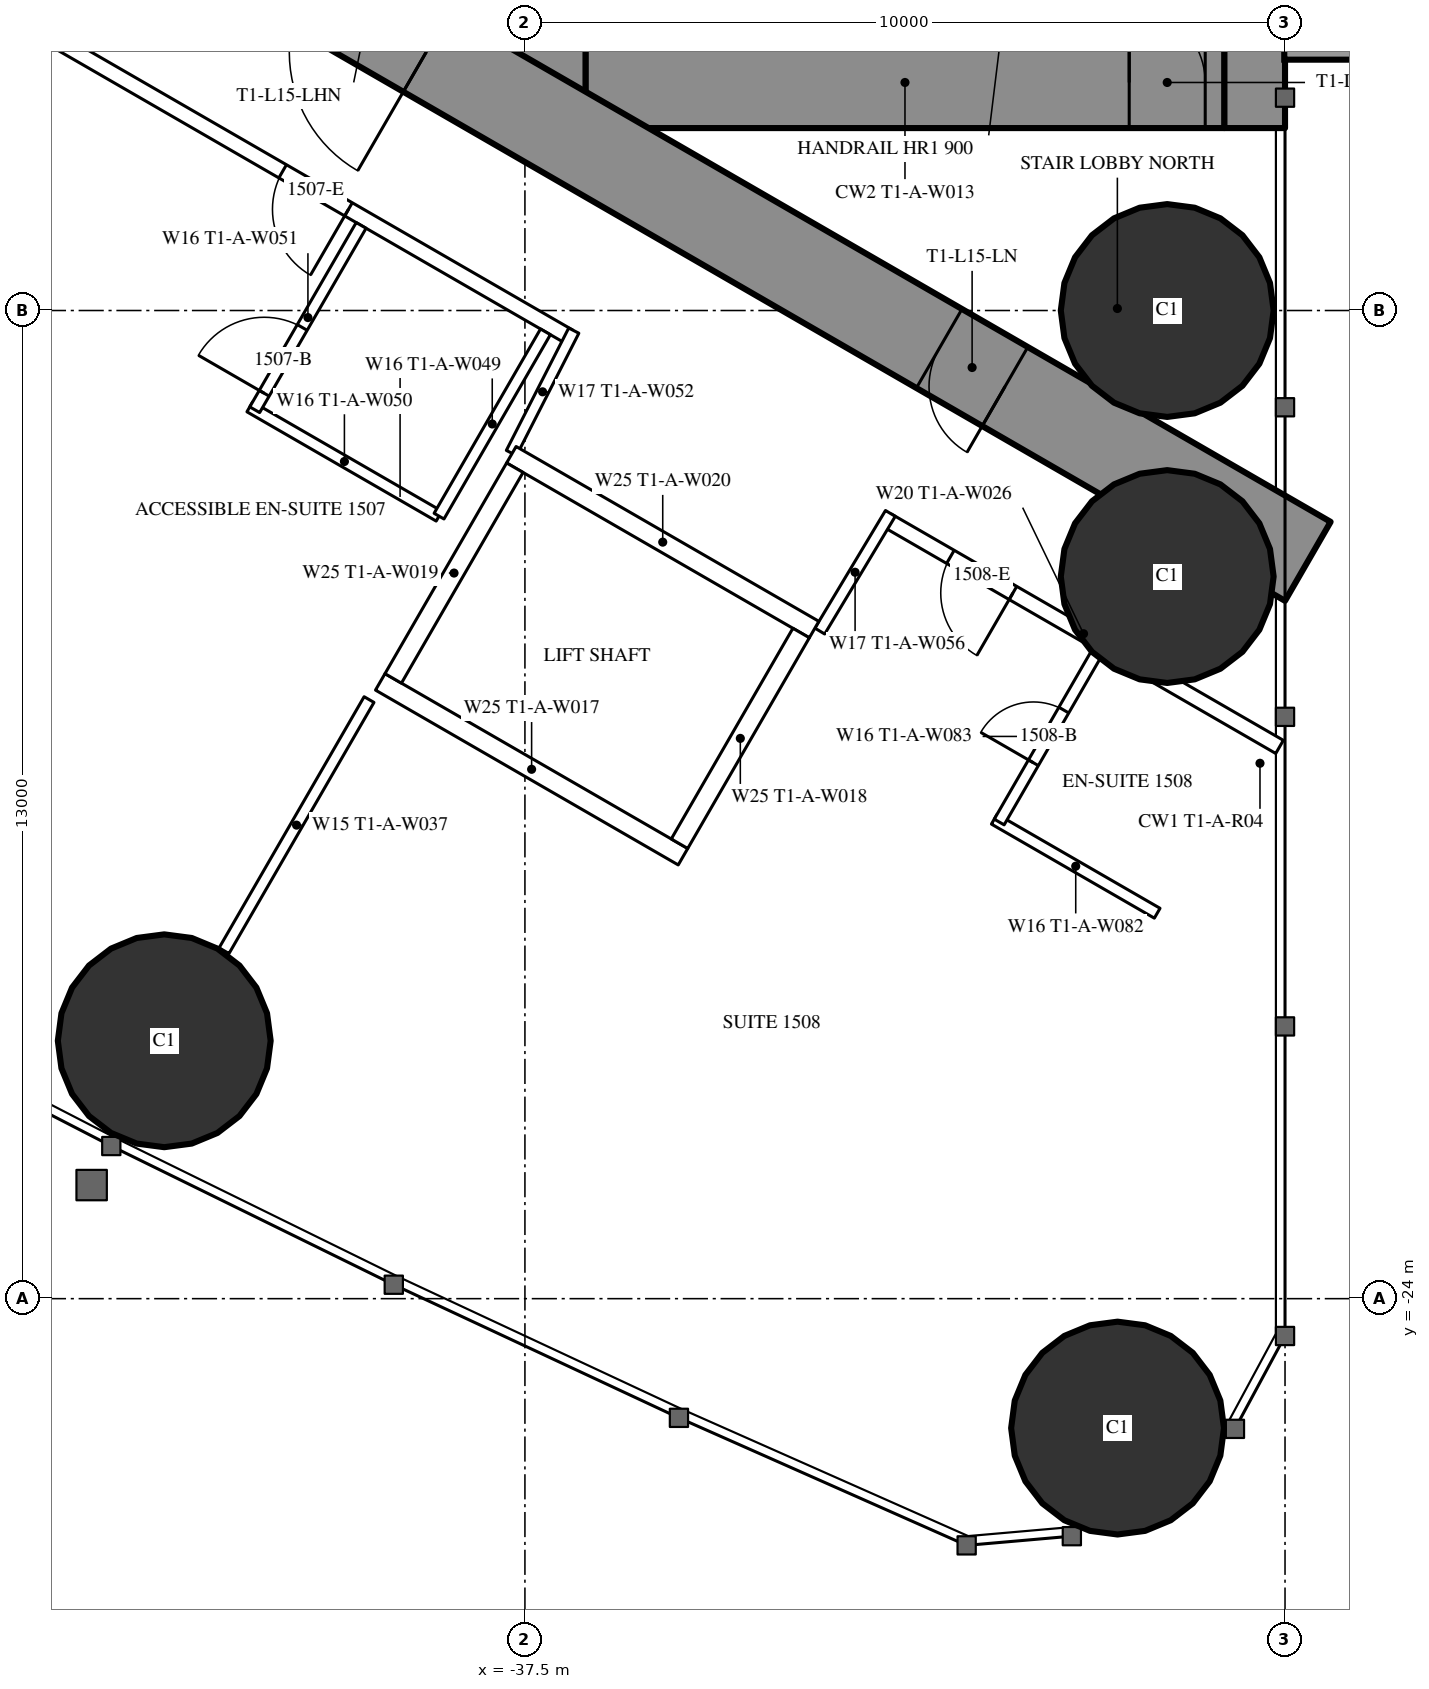
"""IFC4 building model, lengths in metres.
Left out: names, types, materials, properties, quantities, classifications, styles, units other than length and angle.
Written with IfcOpenShell. Run it as: python <this file> out.ifc"""

import sys

from ifc_helpers import new_model, si_unit, direction, frame, frame_2d, origin, origin_2d, place, context, subcontext, project, spatial, rectangle, hollow_circle, extrude, element, fill, save


model = new_model("IFC4")
c1 = context("Model", 3, precision=1e-05, world=origin(), true_north=direction((0.0, 1.0)))
c2 = subcontext(c1, "Body", "Model", "MODEL_VIEW")
j1 = project(units=[si_unit("LENGTHUNIT", "METRE"), si_unit("PLANEANGLEUNIT", "RADIAN")], contexts=[c1])
p1 = place(None, origin())
s1 = spatial("IfcSite", under=j1, at=p1, CompositionType="ELEMENT")
p2 = place(p1, origin())
s2 = spatial("IfcBuilding", under=s1, at=p2, CompositionType="ELEMENT")
p3 = place(p2, frame((0.0, 0.0, 60.0)))
s3 = spatial("IfcBuildingStorey", under=s2, at=p3, CompositionType="ELEMENT", Elevation=60.0)
for number, where, z_axis, x_axis in (
    (1, (-29.703, -25.703, 0.0), (0.0, 0.0, 1.0), (1.0, 0.0, 0.0)),
    (2, (-29.05, -11.0, 0.0), (0.0, 0.0, 1.0), (1.0, 0.0, 0.0)),
    (3, (-29.05, -14.5, 0.0), (0.0, 0.0, 1.0), (1.0, 0.0, 0.0)),
    (4, (-42.245, -20.607, 0.0), (0.0, 0.0, 1.0), (1.0, 0.0, 0.0)),
):
    element("IfcColumn", number, at=place(p3, frame(where, z_axis=z_axis, x_axis=x_axis)), inside=s3, PredefinedType="COLUMN", context=c2, shape_type="SweptSolid", body=[
        extrude(hollow_circle(Radius=1.4, WallThickness=0.12, at=origin_2d()), origin(), (0.0, 0.0, 1.0), 3.5),
    ])
p4 = place(p3, frame((-27.9, 8.6, 0.0), z_axis=(0.0, 0.0, 1.0), x_axis=(0.0, -1.0, 0.0)))
e5 = element("IfcWall", 5, at=p4, inside=s3, PredefinedType="SHEAR", context=c2, shape_type="SweptSolid", body=[
    extrude(rectangle(XDim=17.2, YDim=0.8, at=frame_2d((8.6, 0.0))), origin(), (0.0, 0.0, 1.0), 3.5),
])
p5 = place(p4, frame((2.45, 0.0, 0.6)))
e6 = element("IfcOpeningElement", 6, at=p5, cuts=e5, PredefinedType="OPENING", context=c2, shape_type="SweptSolid", body=[
    extrude(rectangle(XDim=0.6, YDim=2.1, at=frame_2d((0.3, 1.05))), frame((0.0, 0.41, 0.0), z_axis=(0.0, -1.0, 0.0), x_axis=(1.0, 0.0, 0.0)), (0.0, 0.0, 1.0), 0.82),
])
p6 = place(p4, frame((14.15, 0.0, 0.6)))
e7 = element("IfcOpeningElement", 7, at=p6, cuts=e5, PredefinedType="OPENING", context=c2, shape_type="SweptSolid", body=[
    extrude(rectangle(XDim=0.6, YDim=2.1, at=frame_2d((0.3, 1.05))), frame((0.0, 0.41, 0.0), z_axis=(0.0, -1.0, 0.0), x_axis=(1.0, 0.0, 0.0)), (0.0, 0.0, 1.0), 0.82),
])
p7 = place(p3, frame((-37.3, 8.6, 0.0), z_axis=(0.0, 0.0, 1.0), x_axis=(0.0, -1.0, 0.0)))
e8 = element("IfcWall", 8, at=p7, inside=s3, PredefinedType="SHEAR", context=c2, shape_type="SweptSolid", body=[
    extrude(rectangle(XDim=17.2, YDim=1.2, at=frame_2d((8.6, 0.0))), origin(), (0.0, 0.0, 1.0), 3.5),
])
p8 = place(p7, frame((7.7, 0.0, 0.0)))
e9 = element("IfcOpeningElement", 9, at=p8, cuts=e8, PredefinedType="OPENING", context=c2, shape_type="SweptSolid", body=[
    extrude(rectangle(XDim=1.8, YDim=2.2, at=frame_2d((0.9, 1.1))), frame((0.0, 0.61, 0.0), z_axis=(0.0, -1.0, 0.0), x_axis=(1.0, 0.0, 0.0)), (0.0, 0.0, 1.0), 1.22),
])
p9 = place(p3, frame((-28.3, -8.0, 0.0), z_axis=(0.0, 0.0, 1.0), x_axis=(-1.0, 0.0, 0.0)))
e10 = element("IfcWall", 10, at=p9, inside=s3, PredefinedType="SHEAR", context=c2, shape_type="SweptSolid", body=[
    extrude(rectangle(XDim=8.4, YDim=1.2, at=frame_2d((4.2, 0.0))), origin(), (0.0, 0.0, 1.0), 3.5),
])
p10 = place(p9, frame((0.25, 0.0, 0.0)))
e11 = element("IfcOpeningElement", 11, at=p10, cuts=e10, PredefinedType="OPENING", context=c2, shape_type="SweptSolid", body=[
    extrude(rectangle(XDim=1.0, YDim=2.2, at=frame_2d((0.5, 1.1))), frame((0.0, 0.61, 0.0), z_axis=(0.0, -1.0, 0.0), x_axis=(1.0, 0.0, 0.0)), (0.0, 0.0, 1.0), 1.22),
])
p11 = place(p3, frame((-27.2, -14.3, 0.0), z_axis=(0.0, 0.0, 1.0), x_axis=(-0.866024021859, 0.500002393557, 0.0)))
e12 = element("IfcWall", 12, at=p11, inside=s3, PredefinedType="SHEAR", context=c2, shape_type="SweptSolid", body=[
    extrude(rectangle(XDim=27.907, YDim=1.2, at=frame_2d((13.954, 0.0))), origin(), (0.0, 0.0, 1.0), 3.5),
])
p12 = place(p11, frame((4.6, 0.0, 0.0)))
e13 = element("IfcOpeningElement", 13, at=p12, cuts=e12, PredefinedType="OPENING", context=c2, shape_type="SweptSolid", body=[
    extrude(rectangle(XDim=1.0, YDim=2.2, at=frame_2d((0.5, 1.1))), frame((0.0, 0.61, 0.0), z_axis=(0.0, -1.0, 0.0), x_axis=(1.0, 0.0, 0.0)), (0.0, 0.0, 1.0), 1.22),
])
p13 = place(p11, frame((13.395, 0.0, 0.0)))
e14 = element("IfcOpeningElement", 14, at=p13, cuts=e12, PredefinedType="OPENING", context=c2, shape_type="SweptSolid", body=[
    extrude(rectangle(XDim=1.8, YDim=2.2, at=frame_2d((0.9, 1.1))), frame((0.0, 0.61, 0.0), z_axis=(0.0, -1.0, 0.0), x_axis=(1.0, 0.0, 0.0)), (0.0, 0.0, 1.0), 1.22),
])
p14 = place(p3, frame((-39.551, -16.118, 0.0), z_axis=(0.0, 0.0, 1.0), x_axis=(-0.499986503906, -0.866033195618, 0.0)))
e15 = element("IfcWall", 15, at=p14, inside=s3, PredefinedType="PARTITIONING", context=c2, shape_type="SweptSolid", body=[
    extrude(rectangle(XDim=3.815, YDim=0.15, at=frame_2d((1.907, 0.0))), origin(), (0.0, 0.0, 1.0), 3.25),
])
p15 = place(p3, frame((-27.572, -16.741, 0.0), z_axis=(0.0, 0.0, 1.0), x_axis=(-0.866024464444, 0.500001626982, 0.0)))
e16 = element("IfcWall", 16, at=p15, inside=s3, PredefinedType="PARTITIONING", context=c2, shape_type="SweptSolid", body=[
    extrude(rectangle(XDim=5.955, YDim=0.2, at=frame_2d((2.978, 0.0))), origin(), (0.0, 0.0, 1.0), 3.25),
])
p16 = place(p15, frame((4.05, 0.0, 0.0)))
e17 = element("IfcOpeningElement", 17, at=p16, cuts=e16, PredefinedType="OPENING", context=c2, shape_type="SweptSolid", body=[
    extrude(rectangle(XDim=0.95, YDim=2.2, at=frame_2d((0.475, 1.1))), frame((0.0, 0.11, 0.0), z_axis=(0.0, -1.0, 0.0), x_axis=(1.0, 0.0, 0.0)), (0.0, 0.0, 1.0), 0.22),
])
p17 = place(p3, frame((-36.92, -11.344, 0.0), z_axis=(0.0, 0.0, 1.0), x_axis=(-0.866028313256, 0.499994960614, 0.0)))
e18 = element("IfcWall", 18, at=p17, inside=s3, PredefinedType="PARTITIONING", context=c2, shape_type="SweptSolid", body=[
    extrude(rectangle(XDim=22.568, YDim=0.2, at=frame_2d((11.284, 0.0))), origin(), (0.0, 0.0, 1.0), 3.25),
])
p18 = place(p17, frame((12.68, 0.0, 0.0)))
e19 = element("IfcOpeningElement", 19, at=p18, cuts=e18, PredefinedType="OPENING", context=c2, shape_type="SweptSolid", body=[
    extrude(rectangle(XDim=0.95, YDim=2.2, at=frame_2d((0.475, 1.1))), frame((0.0, 0.11, 0.0), z_axis=(0.0, -1.0, 0.0), x_axis=(1.0, 0.0, 0.0)), (0.0, 0.0, 1.0), 0.22),
])
p19 = place(p17, frame((3.35, 0.0, 0.0)))
e20 = element("IfcOpeningElement", 20, at=p19, cuts=e18, PredefinedType="OPENING", context=c2, shape_type="SweptSolid", body=[
    extrude(rectangle(XDim=1.0, YDim=2.2, at=frame_2d((0.5, 1.1))), frame((0.0, 0.11, 0.0), z_axis=(0.0, -1.0, 0.0), x_axis=(1.0, 0.0, 0.0)), (0.0, 0.0, 1.0), 0.22),
])
p20 = place(p3, frame((-36.857, -11.265, 0.0), z_axis=(0.0, 0.0, 1.0), x_axis=(-0.454225294761, -0.890886851176, 0.0)))
e21 = element("IfcWall", 21, at=p20, inside=s3, PredefinedType="PARTITIONING", context=c2, shape_type="SweptSolid", body=[
    extrude(rectangle(XDim=1.807, YDim=0.15, at=frame_2d((0.904, 0.0))), origin(), (0.0, 0.0, 1.0), 3.25),
])
p21 = place(p3, frame((-33.621, -15.218, 0.0), z_axis=(0.0, 0.0, 1.0), x_axis=(0.514336634837, 0.857588377991, 0.0)))
e22 = element("IfcWall", 22, at=p21, inside=s3, PredefinedType="PARTITIONING", context=c2, shape_type="SweptSolid", body=[
    extrude(rectangle(XDim=1.805, YDim=0.15, at=frame_2d((0.903, 0.0))), origin(), (0.0, 0.0, 1.0), 3.25),
])
p22 = place(p3, frame((-38.63, -13.705, 0.0), z_axis=(0.0, 0.0, 1.0), x_axis=(-0.866018712932, 0.500011588718, 0.0)))
e23 = element("IfcWall", 23, at=p22, inside=s3, PredefinedType="PARTITIONING", context=c2, shape_type="SweptSolid", body=[
    extrude(rectangle(XDim=2.875, YDim=0.15, at=frame_2d((1.438, 0.0))), origin(), (0.0, 0.0, 1.0), 3.25),
])
p23 = place(p3, frame((-39.655, -9.88, 0.0), z_axis=(0.0, 0.0, 1.0), x_axis=(-0.500049511043, -0.865996816683, 0.0)))
e24 = element("IfcWall", 24, at=p23, inside=s3, PredefinedType="PARTITIONING", context=c2, shape_type="SweptSolid", body=[
    extrude(rectangle(XDim=2.8, YDim=0.15, at=frame_2d((1.4, 0.0))), origin(), (0.0, 0.0, 1.0), 3.25),
])
p24 = place(p23, frame((1.55, 0.0, 0.0)))
e25 = element("IfcOpeningElement", 25, at=p24, cuts=e24, PredefinedType="OPENING", context=c2, shape_type="SweptSolid", body=[
    extrude(rectangle(XDim=1.0, YDim=2.2, at=frame_2d((0.5, 1.1))), frame((0.0, 0.085, 0.0), z_axis=(0.0, -1.0, 0.0), x_axis=(1.0, 0.0, 0.0)), (0.0, 0.0, 1.0), 0.17),
])
p25 = place(p3, frame((-37.23, -11.281, 0.0), z_axis=(0.0, 0.0, 1.0), x_axis=(-0.500049511043, -0.865996816683, 0.0)))
e26 = element("IfcWall", 26, at=p25, inside=s3, PredefinedType="PARTITIONING", context=c2, shape_type="SweptSolid", body=[
    extrude(rectangle(XDim=2.8, YDim=0.15, at=frame_2d((1.4, 0.0))), origin(), (0.0, 0.0, 1.0), 3.25),
])
p26 = place(p3, frame((-29.182, -18.929, 0.0), z_axis=(0.0, 0.0, 1.0), x_axis=(-0.866006523861, 0.500032699561, 0.0)))
e27 = element("IfcWall", 27, at=p26, inside=s3, PredefinedType="PARTITIONING", context=c2, shape_type="SweptSolid", body=[
    extrude(rectangle(XDim=2.475, YDim=0.15, at=frame_2d((1.237, 0.0))), origin(), (0.0, 0.0, 1.0), 3.25),
])
p27 = place(p3, frame((-29.96, -15.478, 0.0), z_axis=(0.0, 0.0, 1.0), x_axis=(-0.500006934395, -0.866021400173, 0.0)))
e28 = element("IfcWall", 28, at=p27, inside=s3, PredefinedType="PARTITIONING", context=c2, shape_type="SweptSolid", body=[
    extrude(rectangle(XDim=2.6, YDim=0.15, at=frame_2d((1.3, 0.0))), origin(), (0.0, 0.0, 1.0), 3.25),
])
p28 = place(p27, frame((0.9, 0.0, 0.0)))
e29 = element("IfcOpeningElement", 29, at=p28, cuts=e28, PredefinedType="OPENING", context=c2, shape_type="SweptSolid", body=[
    extrude(rectangle(XDim=0.8, YDim=2.2, at=frame_2d((0.4, 1.1))), frame((0.0, 0.085, 0.0), z_axis=(0.0, -1.0, 0.0), x_axis=(1.0, 0.0, 0.0)), (0.0, 0.0, 1.0), 0.17),
])
p29 = place(p3, frame((-33.696, -15.197, 0.0), z_axis=(0.0, 0.0, 1.0), x_axis=(-0.865976953817, 0.500083908417, 0.0)))
e30 = element("IfcWall", 30, at=p29, inside=s3, PredefinedType="PARTITIONING", context=c2, shape_type="SweptSolid", body=[
    extrude(rectangle(XDim=4.599, YDim=0.25, at=frame_2d((2.3, 0.0))), origin(), (0.0, 0.0, 1.0), 3.25),
])
p30 = place(p3, frame((-35.42, -18.186, 0.0), z_axis=(0.0, 0.0, 1.0), x_axis=(-0.865990227814, 0.50006092162, 0.0)))
e31 = element("IfcWall", 31, at=p30, inside=s3, PredefinedType="PARTITIONING", context=c2, shape_type="SweptSolid", body=[
    extrude(rectangle(XDim=4.6, YDim=0.25, at=frame_2d((2.3, 0.0))), origin(), (0.0, 0.0, 1.0), 3.25),
])
p31 = place(p3, frame((-33.866, -15.243, 0.0), z_axis=(0.0, 0.0, 1.0), x_axis=(-0.499929347863, -0.866066190972, 0.0)))
e32 = element("IfcWall", 32, at=p31, inside=s3, PredefinedType="PARTITIONING", context=c2, shape_type="SweptSolid", body=[
    extrude(rectangle(XDim=3.201, YDim=0.25, at=frame_2d((1.6, 0.0))), origin(), (0.0, 0.0, 1.0), 3.25),
])
p32 = place(p3, frame((-37.633, -13.068, 0.0), z_axis=(0.0, 0.0, 1.0), x_axis=(-0.499872130319, -0.866099216793, 0.0)))
e33 = element("IfcWall", 33, at=p32, inside=s3, PredefinedType="PARTITIONING", context=c2, shape_type="SweptSolid", body=[
    extrude(rectangle(XDim=3.2, YDim=0.25, at=frame_2d((1.6, 0.0))), origin(), (0.0, 0.0, 1.0), 3.25),
])
p33 = place(p24, origin())
e34 = element("IfcDoor", 34, at=p33, inside=s3, OperationType="SINGLE_SWING_RIGHT", PredefinedType="DOOR", context=c2, shape_type="SweptSolid", body=[
    extrude(rectangle(XDim=1.0, YDim=2.2, at=frame_2d((0.5, 1.1))), frame((0.0, 0.025, 0.0), z_axis=(0.0, -1.0, 0.0), x_axis=(1.0, 0.0, 0.0)), (0.0, 0.0, 1.0), 0.05),
])
fill(e25, e34)
p34 = place(p19, origin())
e35 = element("IfcDoor", 35, at=p34, inside=s3, OperationType="SINGLE_SWING_LEFT", PredefinedType="DOOR", context=c2, shape_type="SweptSolid", body=[
    extrude(rectangle(XDim=1.0, YDim=2.2, at=frame_2d((0.5, 1.1))), frame((0.0, 0.025, 0.0), z_axis=(0.0, -1.0, 0.0), x_axis=(1.0, 0.0, 0.0)), (0.0, 0.0, 1.0), 0.05),
])
fill(e20, e35)
p35 = place(p28, origin())
e36 = element("IfcDoor", 36, at=p35, inside=s3, OperationType="SINGLE_SWING_RIGHT", PredefinedType="DOOR", context=c2, shape_type="SweptSolid", body=[
    extrude(rectangle(XDim=0.8, YDim=2.2, at=frame_2d((0.4, 1.1))), frame((0.0, 0.025, 0.0), z_axis=(0.0, -1.0, 0.0), x_axis=(1.0, 0.0, 0.0)), (0.0, 0.0, 1.0), 0.05),
])
fill(e29, e36)
p36 = place(p16, origin())
e37 = element("IfcDoor", 37, at=p36, inside=s3, OperationType="SINGLE_SWING_LEFT", PredefinedType="DOOR", context=c2, shape_type="SweptSolid", body=[
    extrude(rectangle(XDim=0.95, YDim=2.2, at=frame_2d((0.475, 1.1))), frame((0.0, 0.025, 0.0), z_axis=(0.0, -1.0, 0.0), x_axis=(1.0, 0.0, 0.0)), (0.0, 0.0, 1.0), 0.05),
])
fill(e17, e37)
p37 = place(p12, origin())
e38 = element("IfcDoor", 38, at=p37, inside=s3, OperationType="SINGLE_SWING_LEFT", PredefinedType="DOOR", context=c2, shape_type="SweptSolid", body=[
    extrude(rectangle(XDim=1.0, YDim=2.2, at=frame_2d((0.5, 1.1))), frame((0.0, 0.025, 0.0), z_axis=(0.0, -1.0, 0.0), x_axis=(1.0, 0.0, 0.0)), (0.0, 0.0, 1.0), 0.05),
])
fill(e13, e38)
p38 = place(p13, origin())
e39 = element("IfcDoor", 39, at=p38, inside=s3, OperationType="DOUBLE_DOOR_SINGLE_SWING", PredefinedType="DOOR", context=c2, shape_type="SweptSolid", body=[
    extrude(rectangle(XDim=1.8, YDim=2.2, at=frame_2d((0.9, 1.1))), frame((0.0, 0.025, 0.0), z_axis=(0.0, -1.0, 0.0), x_axis=(1.0, 0.0, 0.0)), (0.0, 0.0, 1.0), 0.05),
])
fill(e14, e39)
p39 = place(p10, origin())
e40 = element("IfcDoor", 40, at=p39, inside=s3, OperationType="SINGLE_SWING_RIGHT", PredefinedType="DOOR", context=c2, shape_type="SweptSolid", body=[
    extrude(rectangle(XDim=1.0, YDim=2.2, at=frame_2d((0.5, 1.1))), frame((0.0, 0.025, 0.0), z_axis=(0.0, -1.0, 0.0), x_axis=(1.0, 0.0, 0.0)), (0.0, 0.0, 1.0), 0.05),
])
fill(e11, e40)
save(model, sys.argv[1])
